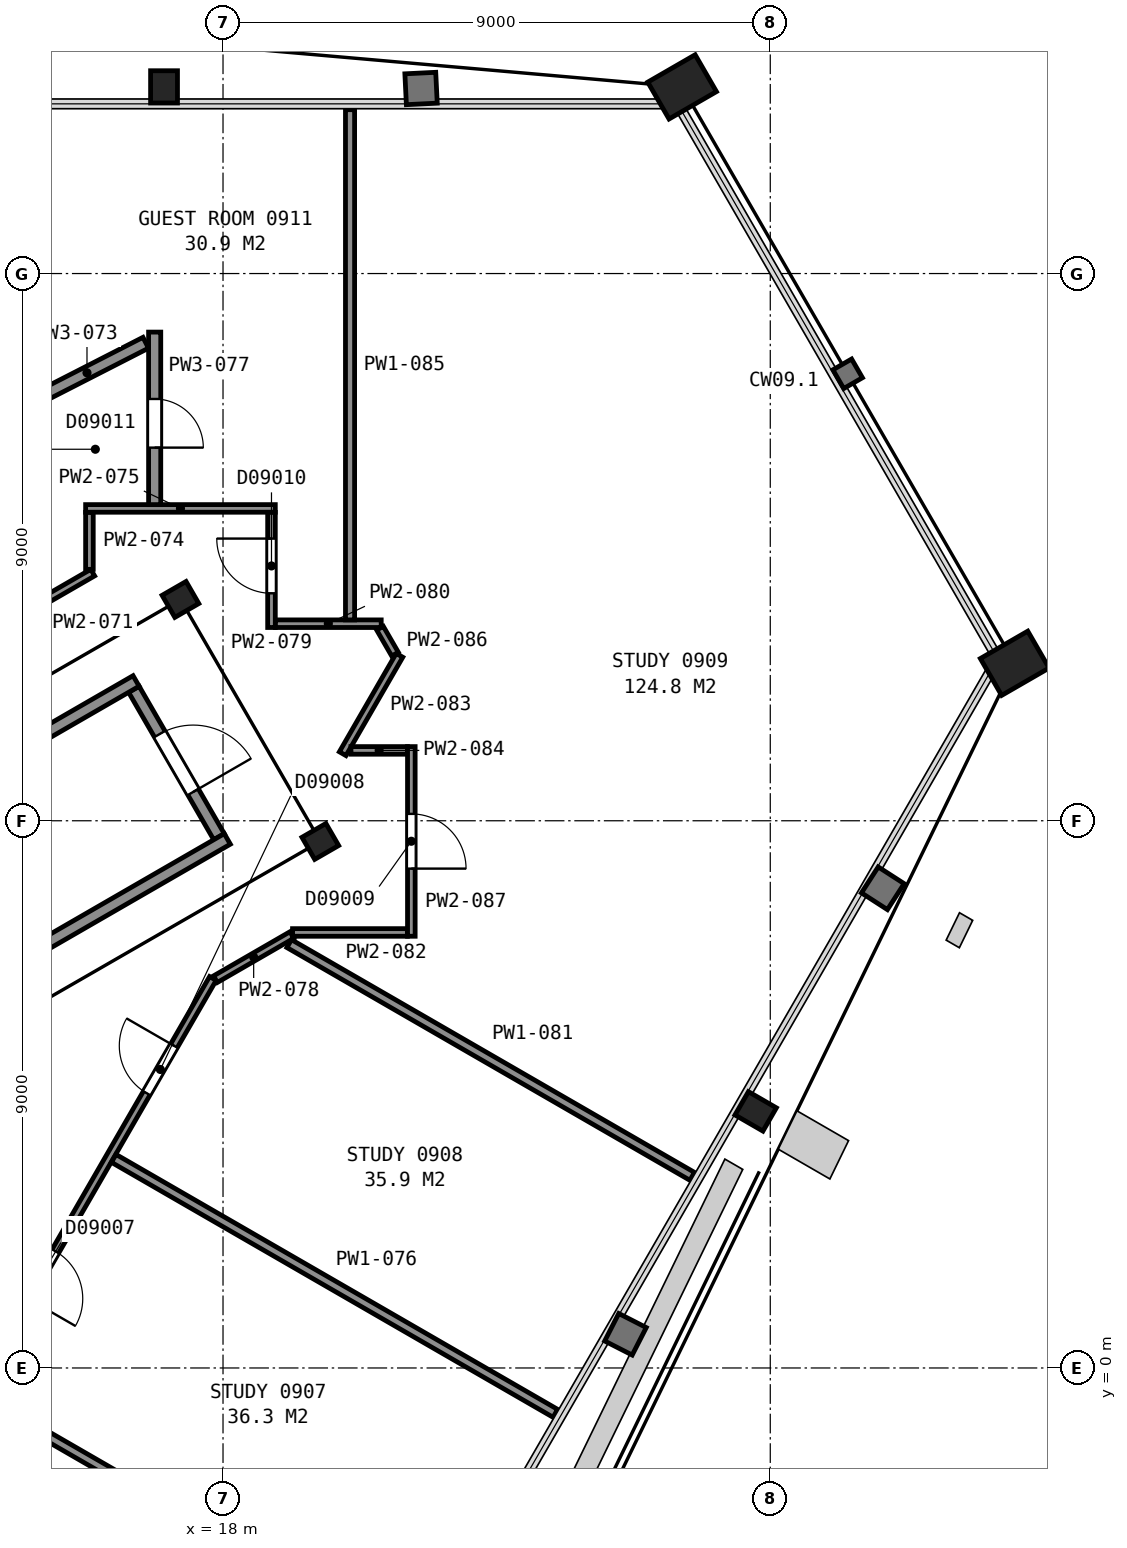
"""IFC4 building model, lengths in metres.
Left out: names, types, materials, properties, quantities, classifications, styles, units other than length and angle.
Written with IfcOpenShell. Run it as: python <this file> out.ifc"""

import sys

from ifc_helpers import new_model, si_unit, direction, frame, frame_2d, origin, origin_2d, place, context, subcontext, project, spatial, rectangle, hollow_rectangle, i_section, extrude, element, fill, save


model = new_model("IFC4")
c1 = context("Model", 3, precision=1e-05, world=origin(), true_north=direction((0.0, 1.0)))
c2 = subcontext(c1, "Body", "Model", "MODEL_VIEW")
j1 = project(units=[si_unit("LENGTHUNIT", "METRE"), si_unit("PLANEANGLEUNIT", "RADIAN")], contexts=[c1])
p1 = place(None, origin())
s1 = spatial("IfcSite", under=j1, at=p1, CompositionType="ELEMENT")
p2 = place(p1, origin())
s2 = spatial("IfcBuilding", under=s1, at=p2, CompositionType="ELEMENT")
p3 = place(p2, frame((0.0, 0.0, 47.6)))
s3 = spatial("IfcBuildingStorey", under=s2, at=p3, CompositionType="ELEMENT", Elevation=47.6)
p4 = place(p3, frame((25.55, 21.07, 0.04), z_axis=(0.0, 0.0, 1.0), x_axis=(0.5, -0.866025403784, 0.0)))
e1 = element("IfcColumn", 1, at=p4, inside=s3, PredefinedType="COLUMN", context=c2, shape_type="SweptSolid", body=[
    extrude(hollow_rectangle(XDim=0.7, YDim=0.9, WallThickness=0.065, at=origin_2d()), origin(), (0.0, 0.0, 1.0), 3.56),
])
for number, where, z_axis, x_axis in (
    (2, (17.03, 21.07, 0.025), (0.0, 0.0, 1.0), (1.0, 0.0, 0.0)),
    (3, (26.76, 4.22, 0.025), (0.0, 0.0, 1.0), (-0.5, -0.866, 0.0)),
):
    element("IfcColumn", number, at=place(p3, frame(where, z_axis=z_axis, x_axis=x_axis)), inside=s3, PredefinedType="COLUMN", context=c2, shape_type="SweptSolid", body=[
        extrude(i_section(OverallWidth=0.442, OverallDepth=0.531, WebThickness=0.066, FlangeThickness=0.106, FilletRadius=0.015, at=origin_2d()), origin(), (0.0, 0.0, 1.0), 3.575),
    ])
p5 = place(p3, frame((31.02, 11.59, 0.04), z_axis=(0.0, 0.0, 1.0), x_axis=(0.5, -0.866025403784, 0.0)))
e4 = element("IfcColumn", 4, at=p5, inside=s3, PredefinedType="COLUMN", context=c2, shape_type="SweptSolid", body=[
    extrude(hollow_rectangle(XDim=0.7, YDim=0.9, WallThickness=0.065, at=origin_2d()), origin(), (0.0, 0.0, 1.0), 3.56),
])
for number, where, z_axis, x_axis in (
    (5, (19.6, 8.66, 0.0), (0.0, 0.0, 1.0), (0.5, -0.866, 0.0)),
    (6, (17.3, 12.64, 0.0), (0.0, 0.0, 1.0), (0.5, -0.866, 0.0)),
):
    element("IfcColumn", number, at=place(p3, frame(where, z_axis=z_axis, x_axis=x_axis)), inside=s3, PredefinedType="COLUMN", context=c2, shape_type="SweptSolid", body=[
        extrude(i_section(OverallWidth=0.419, OverallDepth=0.455, WebThickness=0.042, FlangeThickness=0.068, FilletRadius=0.015, at=origin_2d()), origin(), (0.0, 0.0, 1.0), 3.6),
    ])
p6 = place(p3, frame((17.934, 8.738, 0.0), z_axis=(0.0, 0.0, 1.0), x_axis=(-0.49998411664, 0.866034573852, 0.0)))
e7 = element("IfcWall", 7, at=p6, inside=s3, PredefinedType="PARTITIONING", context=c2, shape_type="SweptSolid", body=[
    extrude(rectangle(XDim=2.8, YDim=0.2, at=frame_2d((1.4, 0.0))), origin(), (0.0, 0.0, 1.0), 3.35),
])
p7 = place(p6, frame((0.85, 0.0, 0.0)))
e8 = element("IfcOpeningElement", 8, at=p7, cuts=e7, PredefinedType="OPENING", context=c2, shape_type="SweptSolid", body=[
    extrude(rectangle(XDim=1.1, YDim=2.1, at=frame_2d((0.55, 1.05))), frame((0.0, 0.11, 0.0), z_axis=(0.0, -1.0, 0.0), x_axis=(1.0, 0.0, 0.0)), (0.0, 0.0, 1.0), 0.22),
])
for number, where, z_axis, x_axis in (
    (9, (6.178, 5.299, 0.0), (0.0, 0.0, 1.0), (0.866, 0.5, 0.0)),
    (10, (7.678, 2.701, 0.0), (0.0, 0.0, 1.0), (0.866, 0.5, 0.0)),
):
    element("IfcWall", number, at=place(p3, frame(where, z_axis=z_axis, x_axis=x_axis)), inside=s3, PredefinedType="PARTITIONING", context=c2, shape_type="SweptSolid", body=[
        extrude(rectangle(XDim=12.0, YDim=0.2, at=frame_2d((6.0, 0.0))), origin(), (0.0, 0.0, 1.0), 3.35),
    ])
p8 = place(p3, frame((17.833, 6.406, 0.0), z_axis=(0.0, 0.0, 1.0), x_axis=(-0.500002884005, -0.866023738697, 0.0)))
e11 = element("IfcWall", 11, at=p8, inside=s3, PredefinedType="PARTITIONING", context=c2, shape_type="SweptSolid", body=[
    extrude(rectangle(XDim=28.135, YDim=0.125, at=frame_2d((14.067, 0.0))), origin(), (0.0, 0.0, 1.0), 2.613),
])
p9 = place(p8, frame((26.522, 0.0, 0.0)))
e12 = element("IfcOpeningElement", 12, at=p9, cuts=e11, PredefinedType="OPENING", context=c2, shape_type="SweptSolid", body=[
    extrude(rectangle(XDim=0.9, YDim=2.1, at=frame_2d((0.45, 1.05))), frame((0.0, 0.073, 0.0), z_axis=(0.0, -1.0, 0.0), x_axis=(1.0, 0.0, 0.0)), (0.0, 0.0, 1.0), 0.145),
])
p10 = place(p8, frame((23.184, 0.0, 0.0)))
e13 = element("IfcOpeningElement", 13, at=p10, cuts=e11, PredefinedType="OPENING", context=c2, shape_type="SweptSolid", body=[
    extrude(rectangle(XDim=0.9, YDim=2.1, at=frame_2d((0.45, 1.05))), frame((0.0, 0.073, 0.0), z_axis=(0.0, -1.0, 0.0), x_axis=(1.0, 0.0, 0.0)), (0.0, 0.0, 1.0), 0.145),
])
p11 = place(p8, frame((18.683, 0.0, 0.0)))
e14 = element("IfcOpeningElement", 14, at=p11, cuts=e11, PredefinedType="OPENING", context=c2, shape_type="SweptSolid", body=[
    extrude(rectangle(XDim=0.9, YDim=2.1, at=frame_2d((0.45, 1.05))), frame((0.0, 0.073, 0.0), z_axis=(0.0, -1.0, 0.0), x_axis=(1.0, 0.0, 0.0)), (0.0, 0.0, 1.0), 0.145),
])
p12 = place(p8, frame((14.182, 0.0, 0.0)))
e15 = element("IfcOpeningElement", 15, at=p12, cuts=e11, PredefinedType="OPENING", context=c2, shape_type="SweptSolid", body=[
    extrude(rectangle(XDim=0.9, YDim=2.1, at=frame_2d((0.45, 1.05))), frame((0.0, 0.073, 0.0), z_axis=(0.0, -1.0, 0.0), x_axis=(1.0, 0.0, 0.0)), (0.0, 0.0, 1.0), 0.145),
])
p13 = place(p8, frame((9.681, 0.0, 0.0)))
e16 = element("IfcOpeningElement", 16, at=p13, cuts=e11, PredefinedType="OPENING", context=c2, shape_type="SweptSolid", body=[
    extrude(rectangle(XDim=0.9, YDim=2.1, at=frame_2d((0.45, 1.05))), frame((0.0, 0.073, 0.0), z_axis=(0.0, -1.0, 0.0), x_axis=(1.0, 0.0, 0.0)), (0.0, 0.0, 1.0), 0.145),
])
p14 = place(p8, frame((5.18, 0.0, 0.0)))
e17 = element("IfcOpeningElement", 17, at=p14, cuts=e11, PredefinedType="OPENING", context=c2, shape_type="SweptSolid", body=[
    extrude(rectangle(XDim=0.9, YDim=2.1, at=frame_2d((0.45, 1.05))), frame((0.0, 0.073, 0.0), z_axis=(0.0, -1.0, 0.0), x_axis=(1.0, 0.0, 0.0)), (0.0, 0.0, 1.0), 0.145),
])
p15 = place(p8, frame((1.278, 0.0, 0.0)))
e18 = element("IfcOpeningElement", 18, at=p15, cuts=e11, PredefinedType="OPENING", context=c2, shape_type="SweptSolid", body=[
    extrude(rectangle(XDim=0.9, YDim=2.1, at=frame_2d((0.45, 1.05))), frame((0.0, 0.073, 0.0), z_axis=(0.0, -1.0, 0.0), x_axis=(1.0, 0.0, 0.0)), (0.0, 0.0, 1.0), 0.145),
])
p16 = place(p3, frame((13.951, -0.452, 0.0), z_axis=(0.0, 0.0, 1.0), x_axis=(0.866027553047, -0.499996277349, 0.0)))
e19 = element("IfcWall", 19, at=p16, inside=s3, PredefinedType="PARTITIONING", context=c2, shape_type="SweptSolid", body=[
    extrude(rectangle(XDim=8.387, YDim=0.15, at=frame_2d((4.193, 0.0))), origin(), (0.0, 0.0, 1.0), 2.613),
])
p17 = place(p3, frame((14.476, 12.283, 0.0), z_axis=(0.0, 0.0, 1.0), x_axis=(0.865974057503, 0.500088923824, 0.0)))
e20 = element("IfcWall", 20, at=p17, inside=s3, PredefinedType="PARTITIONING", context=c2, shape_type="SweptSolid", body=[
    extrude(rectangle(XDim=1.595, YDim=0.125, at=frame_2d((0.798, 0.0))), origin(), (0.0, 0.0, 1.0), 2.613),
])
p18 = place(p3, frame((14.797, 15.873, 0.0), z_axis=(0.0, 0.0, 1.0), x_axis=(0.890181338078, 0.455606392995, 0.0)))
e21 = element("IfcWall", 21, at=p18, inside=s3, PredefinedType="PARTITIONING", context=c2, shape_type="SweptSolid", body=[
    extrude(rectangle(XDim=2.171, YDim=0.2, at=frame_2d((1.085, 0.0))), origin(), (0.0, 0.0, 1.0), 2.613),
])
p19 = place(p3, frame((15.803, 13.135, 0.0), z_axis=(0.0, 0.0, 1.0), x_axis=(0.0, 1.0, 0.0)))
e22 = element("IfcWall", 22, at=p19, inside=s3, PredefinedType="PARTITIONING", context=c2, shape_type="SweptSolid", body=[
    extrude(rectangle(XDim=0.937, YDim=0.125, at=frame_2d((0.469, 0.0))), origin(), (0.0, 0.0, 1.0), 2.613),
])
p20 = place(p3, frame((15.74, 14.137, 0.0), z_axis=(0.0, 0.0, 1.0), x_axis=(1.0, 0.0, 0.0)))
e23 = element("IfcWall", 23, at=p20, inside=s3, PredefinedType="PARTITIONING", context=c2, shape_type="SweptSolid", body=[
    extrude(rectangle(XDim=3.119, YDim=0.125, at=frame_2d((1.56, 0.0))), origin(), (0.0, 0.0, 1.0), 2.613),
])
p21 = place(p3, frame((16.202, 3.447, 0.0), z_axis=(0.0, 0.0, 1.0), x_axis=(0.866047434595, -0.499961839574, 0.0)))
e24 = element("IfcWall", 24, at=p21, inside=s3, PredefinedType="PARTITIONING", context=c2, shape_type="SweptSolid", body=[
    extrude(rectangle(XDim=8.387, YDim=0.15, at=frame_2d((4.193, 0.0))), origin(), (0.0, 0.0, 1.0), 2.613),
])
p22 = place(p3, frame((16.876, 14.199, 0.0), z_axis=(0.0, 0.0, 1.0), x_axis=(0.0, 1.0, 0.0)))
e25 = element("IfcWall", 25, at=p22, inside=s3, PredefinedType="PARTITIONING", context=c2, shape_type="SweptSolid", body=[
    extrude(rectangle(XDim=2.838, YDim=0.2, at=frame_2d((1.419, 0.0))), origin(), (0.0, 0.0, 1.0), 2.613),
])
p23 = place(p22, frame((0.938, 0.0, 0.0)))
e26 = element("IfcOpeningElement", 26, at=p23, cuts=e25, PredefinedType="OPENING", context=c2, shape_type="SweptSolid", body=[
    extrude(rectangle(XDim=0.8, YDim=2.1, at=frame_2d((0.4, 1.05))), frame((0.0, 0.11, 0.0), z_axis=(0.0, -1.0, 0.0), x_axis=(1.0, 0.0, 0.0)), (0.0, 0.0, 1.0), 0.22),
])
p24 = place(p3, frame((17.875, 6.395, 0.0), z_axis=(0.0, 0.0, 1.0), x_axis=(0.865894215669, 0.500227155672, 0.0)))
e27 = element("IfcWall", 27, at=p24, inside=s3, PredefinedType="PARTITIONING", context=c2, shape_type="SweptSolid", body=[
    extrude(rectangle(XDim=1.451, YDim=0.125, at=frame_2d((0.726, 0.0))), origin(), (0.0, 0.0, 1.0), 2.613),
])
p25 = place(p3, frame((18.797, 14.072, 0.0), z_axis=(0.0, 0.0, 1.0), x_axis=(0.0, -1.0, 0.0)))
e28 = element("IfcWall", 28, at=p25, inside=s3, PredefinedType="PARTITIONING", context=c2, shape_type="SweptSolid", body=[
    extrude(rectangle(XDim=1.894, YDim=0.125, at=frame_2d((0.947, 0.0))), origin(), (0.0, 0.0, 1.0), 2.613),
])
p26 = place(p25, frame((0.431, 0.0, 0.0)))
e29 = element("IfcOpeningElement", 29, at=p26, cuts=e28, PredefinedType="OPENING", context=c2, shape_type="SweptSolid", body=[
    extrude(rectangle(XDim=0.9, YDim=2.1, at=frame_2d((0.45, 1.05))), frame((0.0, 0.073, 0.0), z_axis=(0.0, -1.0, 0.0), x_axis=(1.0, 0.0, 0.0)), (0.0, 0.0, 1.0), 0.145),
])
p27 = place(p3, frame((18.862, 12.241, 0.0), z_axis=(0.0, 0.0, 1.0), x_axis=(1.0, 0.0, 0.0)))
e30 = element("IfcWall", 30, at=p27, inside=s3, PredefinedType="PARTITIONING", context=c2, shape_type="SweptSolid", body=[
    extrude(rectangle(XDim=1.74, YDim=0.125, at=frame_2d((0.87, 0.0))), origin(), (0.0, 0.0, 1.0), 2.613),
])
p28 = place(p3, frame((19.088, 6.979, 0.0), z_axis=(0.0, 0.0, 1.0), x_axis=(0.865990629129, -0.500060226633, 0.0)))
e31 = element("IfcWall", 31, at=p28, inside=s3, PredefinedType="PARTITIONING", context=c2, shape_type="SweptSolid", body=[
    extrude(rectangle(XDim=7.654, YDim=0.15, at=frame_2d((3.827, 0.0))), origin(), (0.0, 0.0, 1.0), 2.613),
])
p29 = place(p3, frame((19.144, 7.163, 0.0), z_axis=(0.0, 0.0, 1.0), x_axis=(1.0, 0.0, 0.0)))
e32 = element("IfcWall", 32, at=p29, inside=s3, PredefinedType="PARTITIONING", context=c2, shape_type="SweptSolid", body=[
    extrude(rectangle(XDim=1.888, YDim=0.125, at=frame_2d((0.944, 0.0))), origin(), (0.0, 0.0, 1.0), 2.613),
])
p30 = place(p3, frame((19.968, 10.103, 0.0), z_axis=(0.0, 0.0, 1.0), x_axis=(0.500072997275, 0.865983254686, 0.0)))
e33 = element("IfcWall", 33, at=p30, inside=s3, PredefinedType="PARTITIONING", context=c2, shape_type="SweptSolid", body=[
    extrude(rectangle(XDim=1.869, YDim=0.125, at=frame_2d((0.935, 0.0))), origin(), (0.0, 0.0, 1.0), 2.613),
])
p31 = place(p3, frame((20.104, 10.157, 0.0), z_axis=(0.0, 0.0, 1.0), x_axis=(1.0, 0.0, 0.0)))
e34 = element("IfcWall", 34, at=p31, inside=s3, PredefinedType="PARTITIONING", context=c2, shape_type="SweptSolid", body=[
    extrude(rectangle(XDim=0.928, YDim=0.125, at=frame_2d((0.464, 0.0))), origin(), (0.0, 0.0, 1.0), 2.613),
])
p32 = place(p3, frame((20.089, 12.303, 0.0), z_axis=(0.0, 0.0, 1.0), x_axis=(0.0, 1.0, 0.0)))
e35 = element("IfcWall", 35, at=p32, inside=s3, PredefinedType="PARTITIONING", context=c2, shape_type="SweptSolid", body=[
    extrude(rectangle(XDim=8.392, YDim=0.15, at=frame_2d((4.196, 0.0))), origin(), (0.0, 0.0, 1.0), 2.613),
])
p33 = place(p3, frame((20.582, 12.167, 0.0), z_axis=(0.0, 0.0, 1.0), x_axis=(0.500450775723, -0.86576499183, 0.0)))
e36 = element("IfcWall", 36, at=p33, inside=s3, PredefinedType="PARTITIONING", context=c2, shape_type="SweptSolid", body=[
    extrude(rectangle(XDim=0.493, YDim=0.125, at=frame_2d((0.247, 0.0))), origin(), (0.0, 0.0, 1.0), 2.613),
])
p34 = place(p3, frame((21.097, 10.219, 0.0), z_axis=(0.0, 0.0, 1.0), x_axis=(0.0, -1.0, 0.0)))
e37 = element("IfcWall", 37, at=p34, inside=s3, PredefinedType="PARTITIONING", context=c2, shape_type="SweptSolid", body=[
    extrude(rectangle(XDim=3.119, YDim=0.125, at=frame_2d((1.56, 0.0))), origin(), (0.0, 0.0, 1.0), 2.613),
])
p35 = place(p34, frame((1.106, 0.0, 0.0)))
e38 = element("IfcOpeningElement", 38, at=p35, cuts=e37, PredefinedType="OPENING", context=c2, shape_type="SweptSolid", body=[
    extrude(rectangle(XDim=0.9, YDim=2.1, at=frame_2d((0.45, 1.05))), frame((0.0, 0.073, 0.0), z_axis=(0.0, -1.0, 0.0), x_axis=(1.0, 0.0, 0.0)), (0.0, 0.0, 1.0), 0.145),
])
p36 = place(p7, origin())
e39 = element("IfcDoor", 39, at=p36, inside=s3, OperationType="SINGLE_SWING_LEFT", PredefinedType="DOOR", context=c2, shape_type="SweptSolid", body=[
    extrude(rectangle(XDim=1.1, YDim=2.1, at=frame_2d((0.55, 1.05))), frame((0.0, 0.025, 0.0), z_axis=(0.0, -1.0, 0.0), x_axis=(1.0, 0.0, 0.0)), (0.0, 0.0, 1.0), 0.05),
])
fill(e8, e39)
p37 = place(p14, origin())
e40 = element("IfcDoor", 40, at=p37, inside=s3, OperationType="SINGLE_SWING_RIGHT", PredefinedType="DOOR", context=c2, shape_type="SweptSolid", body=[
    extrude(rectangle(XDim=0.9, YDim=2.1, at=frame_2d((0.45, 1.05))), frame((0.0, 0.025, 0.0), z_axis=(0.0, -1.0, 0.0), x_axis=(1.0, 0.0, 0.0)), (0.0, 0.0, 1.0), 0.05),
])
fill(e17, e40)
p38 = place(p15, origin())
e41 = element("IfcDoor", 41, at=p38, inside=s3, OperationType="SINGLE_SWING_LEFT", PredefinedType="DOOR", context=c2, shape_type="SweptSolid", body=[
    extrude(rectangle(XDim=0.9, YDim=2.1, at=frame_2d((0.45, 1.05))), frame((0.0, 0.025, 0.0), z_axis=(0.0, -1.0, 0.0), x_axis=(1.0, 0.0, 0.0)), (0.0, 0.0, 1.0), 0.05),
])
fill(e18, e41)
p39 = place(p23, origin())
e42 = element("IfcDoor", 42, at=p39, inside=s3, OperationType="SINGLE_SWING_LEFT", PredefinedType="DOOR", context=c2, shape_type="SweptSolid", body=[
    extrude(rectangle(XDim=0.8, YDim=2.1, at=frame_2d((0.4, 1.05))), frame((0.0, 0.025, 0.0), z_axis=(0.0, -1.0, 0.0), x_axis=(1.0, 0.0, 0.0)), (0.0, 0.0, 1.0), 0.05),
])
fill(e26, e42)
p40 = place(p26, origin())
e43 = element("IfcDoor", 43, at=p40, inside=s3, OperationType="SINGLE_SWING_LEFT", PredefinedType="DOOR", context=c2, shape_type="SweptSolid", body=[
    extrude(rectangle(XDim=0.9, YDim=2.1, at=frame_2d((0.45, 1.05))), frame((0.0, 0.025, 0.0), z_axis=(0.0, -1.0, 0.0), x_axis=(1.0, 0.0, 0.0)), (0.0, 0.0, 1.0), 0.05),
])
fill(e29, e43)
p41 = place(p35, origin())
e44 = element("IfcDoor", 44, at=p41, inside=s3, OperationType="SINGLE_SWING_RIGHT", PredefinedType="DOOR", context=c2, shape_type="SweptSolid", body=[
    extrude(rectangle(XDim=0.9, YDim=2.1, at=frame_2d((0.45, 1.05))), frame((0.0, 0.025, 0.0), z_axis=(0.0, -1.0, 0.0), x_axis=(1.0, 0.0, 0.0)), (0.0, 0.0, 1.0), 0.05),
])
fill(e38, e44)
save(model, sys.argv[1])
